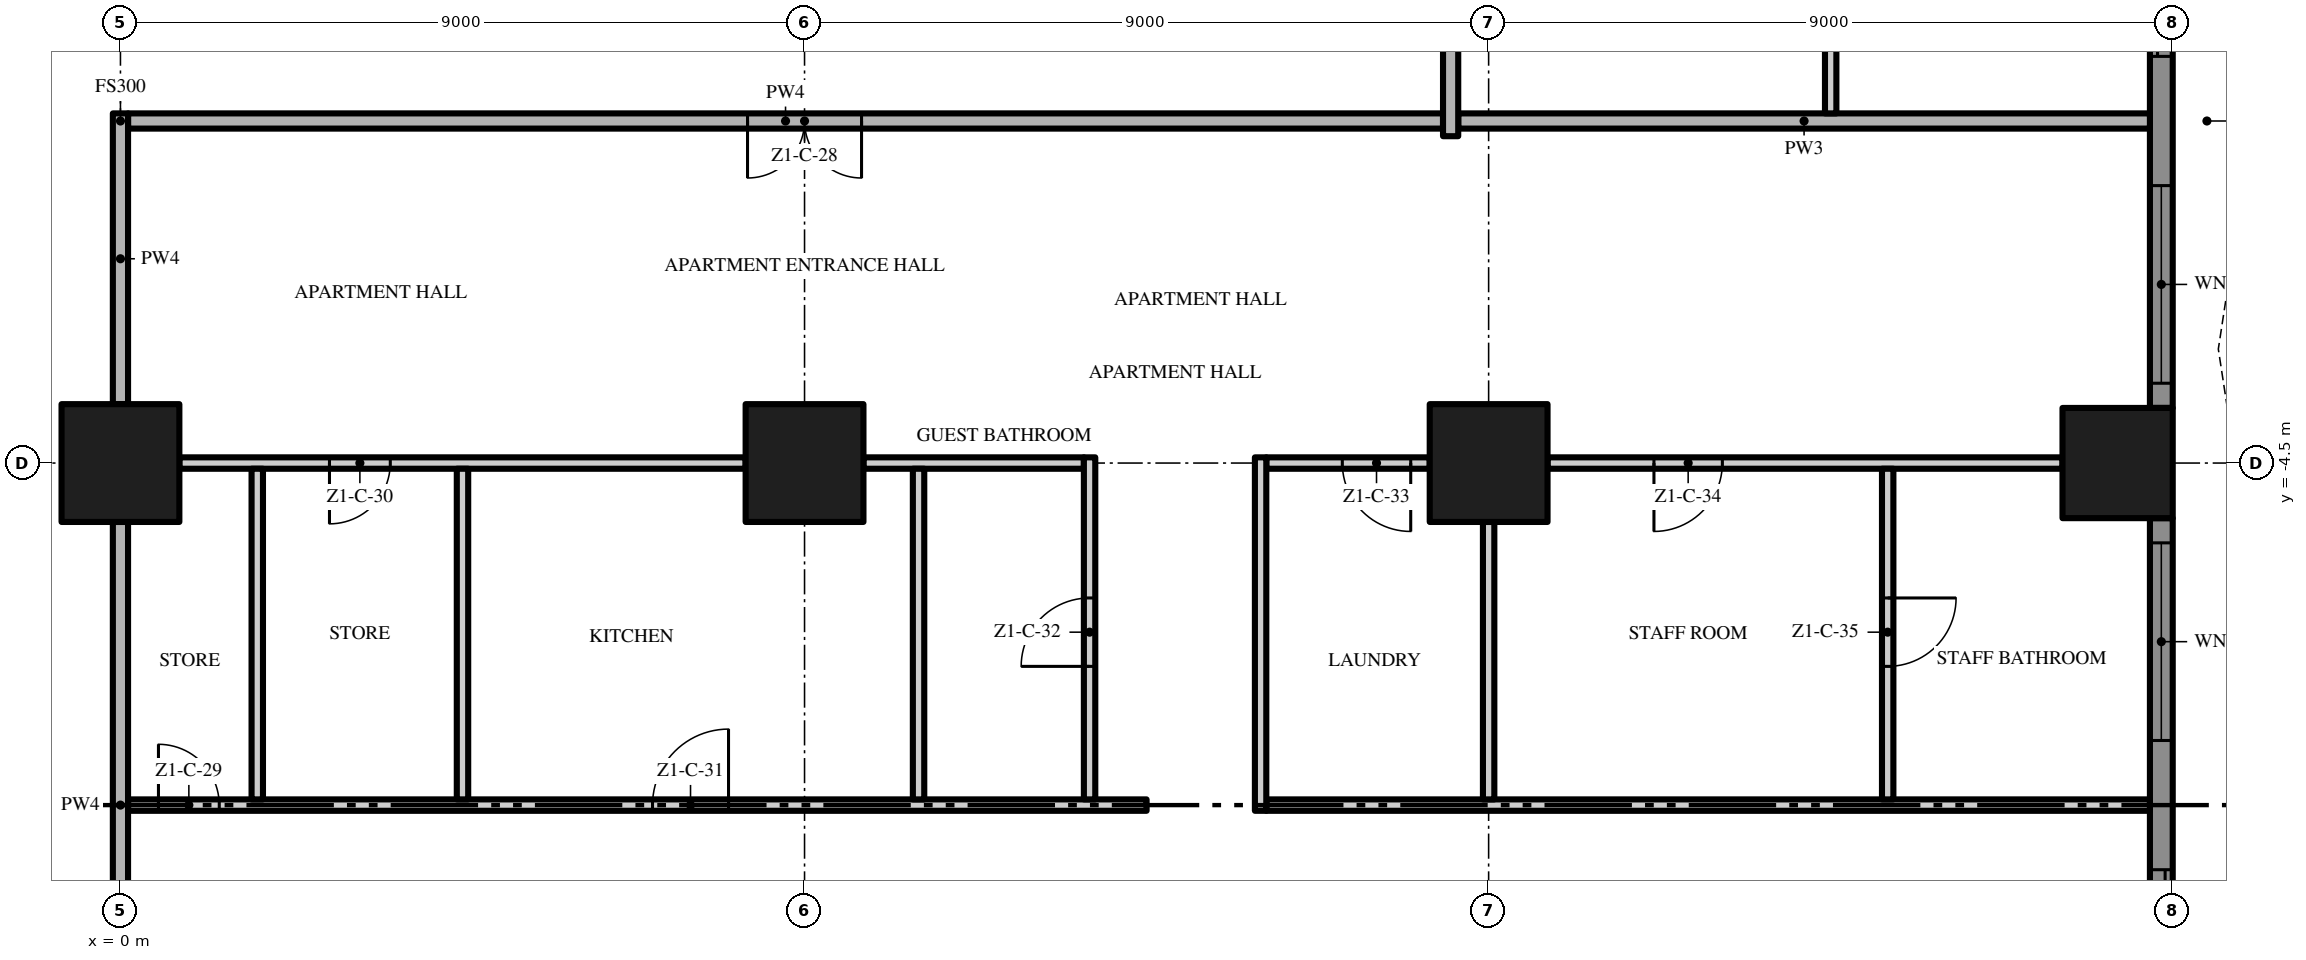
"""IFC4 building model, lengths in metres.
Left out: names, types, materials, properties, quantities, classifications, styles, units other than length and angle.
Written with IfcOpenShell. Run it as: python <this file> out.ifc"""

import sys

from ifc_helpers import new_model, si_unit, direction, frame, frame_2d, origin, origin_2d, place, context, subcontext, project, spatial, polyline, rectangle, outline, extrude, element, fill, save


model = new_model("IFC4")
c1 = context("Model", 3, precision=1e-05, world=origin(), true_north=direction((0.0, 1.0)))
c2 = subcontext(c1, "Body", "Model", "MODEL_VIEW")
j1 = project(units=[si_unit("LENGTHUNIT", "METRE"), si_unit("PLANEANGLEUNIT", "RADIAN")], contexts=[c1])
p1 = place(None, origin())
s1 = spatial("IfcSite", under=j1, at=p1, CompositionType="ELEMENT")
p2 = place(p1, origin())
s2 = spatial("IfcBuilding", under=s1, at=p2, CompositionType="ELEMENT")
p3 = place(p2, frame((0.0, 0.0, 37.8)))
s3 = spatial("IfcBuildingStorey", under=s2, at=p3, CompositionType="ELEMENT", Elevation=37.8)
for number, where, z_axis, x_axis in (
    (1, (0.0, -4.5, 0.0), (0.0, 0.0, 1.0), (1.0, 0.0, 0.0)),
    (2, (18.0, -4.5, 0.0), (0.0, 0.0, 1.0), (1.0, 0.0, 0.0)),
):
    element("IfcColumn", number, at=place(p3, frame(where, z_axis=z_axis, x_axis=x_axis)), inside=s3, PredefinedType="COLUMN", context=c2, shape_type="SweptSolid", body=[
        extrude(rectangle(XDim=1.55, YDim=1.55, at=origin_2d()), origin(), (0.0, 0.0, 1.0), 3.5),
    ])
p4 = place(p3, frame((26.275, -4.5, 0.0), z_axis=(0.0, 0.0, 1.0), x_axis=(1.0, 0.0, 0.0)))
e3 = element("IfcColumn", 3, at=p4, inside=s3, PredefinedType="COLUMN", context=c2, shape_type="SweptSolid", body=[
    extrude(rectangle(XDim=1.45, YDim=1.45, at=origin_2d()), origin(), (0.0, 0.0, 1.0), 3.5),
])
p5 = place(p3, frame((9.0, -4.5, 0.0), z_axis=(0.0, 0.0, 1.0), x_axis=(1.0, 0.0, 0.0)))
e4 = element("IfcColumn", 4, at=p5, inside=s3, PredefinedType="COLUMN", context=c2, shape_type="SweptSolid", body=[
    extrude(rectangle(XDim=1.55, YDim=1.55, at=origin_2d()), origin(), (0.0, 0.0, 1.0), 3.5),
])
p6 = place(p3, frame((26.85, -5.225, 0.0), z_axis=(0.0, 0.0, 1.0), x_axis=(0.0, -1.0, 0.0)))
e5 = element("IfcWall", 5, at=p6, inside=s3, PredefinedType="SOLIDWALL", context=c2, shape_type="SweptSolid", body=[
    extrude(rectangle(XDim=7.55, YDim=0.3, at=frame_2d((3.775, 0.0))), origin(), (0.0, 0.0, 1.0), 3.5),
])
p7 = place(p6, frame((4.625, 0.0, 0.0)))
e6 = element("IfcOpeningElement", 6, at=p7, cuts=e5, PredefinedType="OPENING", context=c2, shape_type="SweptSolid", body=[
    extrude(rectangle(XDim=2.6, YDim=2.4, at=frame_2d((1.3, 1.2))), frame((0.0, 0.16, 0.0), z_axis=(0.0, -1.0, 0.0), x_axis=(1.0, 0.0, 0.0)), (0.0, 0.0, 1.0), 0.32),
])
p8 = place(p6, frame((0.325, 0.0, 0.45)))
e7 = element("IfcOpeningElement", 7, at=p8, cuts=e5, PredefinedType="OPENING", context=c2, shape_type="SweptSolid", body=[
    extrude(rectangle(XDim=2.6, YDim=2.65, at=frame_2d((1.3, 1.325))), frame((0.0, 0.16, 0.0), z_axis=(0.0, -1.0, 0.0), x_axis=(1.0, 0.0, 0.0)), (0.0, 0.0, 1.0), 0.32),
])
p9 = place(p3, frame((26.85, 3.775, 0.0), z_axis=(0.0, 0.0, 1.0), x_axis=(0.0, -1.0, 0.0)))
e8 = element("IfcWall", 8, at=p9, inside=s3, PredefinedType="SOLIDWALL", context=c2, shape_type="SweptSolid", body=[
    extrude(rectangle(XDim=7.55, YDim=0.3, at=frame_2d((3.775, 0.0))), origin(), (0.0, 0.0, 1.0), 3.5),
])
p10 = place(p9, frame((4.625, 0.0, 0.45)))
e9 = element("IfcOpeningElement", 9, at=p10, cuts=e8, PredefinedType="OPENING", context=c2, shape_type="SweptSolid", body=[
    extrude(rectangle(XDim=2.6, YDim=2.65, at=frame_2d((1.3, 1.325))), frame((0.0, 0.16, 0.0), z_axis=(0.0, -1.0, 0.0), x_axis=(1.0, 0.0, 0.0)), (0.0, 0.0, 1.0), 0.32),
])
p11 = place(p9, frame((0.325, 0.0, 0.0)))
e10 = element("IfcOpeningElement", 10, at=p11, cuts=e8, PredefinedType="OPENING", context=c2, shape_type="SweptSolid", body=[
    extrude(rectangle(XDim=2.6, YDim=2.4, at=frame_2d((1.3, 1.2))), frame((0.0, 0.16, 0.0), z_axis=(0.0, -1.0, 0.0), x_axis=(1.0, 0.0, 0.0)), (0.0, 0.0, 1.0), 0.32),
])
p12 = place(p3, origin())
e11 = element("IfcWall", 11, at=p12, inside=s3, PredefinedType="USERDEFINED", context=c2, shape_type="SweptSolid", body=[
    extrude(outline(polyline([(27.6, -18.0), (27.829, -16.5), (28.429, -15.0), (29.171, -13.5), (29.771, -12.0), (30.0, -10.5), (29.771, -9.0), (29.171, -7.5), (28.429, -6.0), (27.829, -4.5), (27.6, -3.0), (27.829, -1.5), (28.429, 0.0), (29.171, 1.5), (29.771, 3.0), (30.0, 4.5), (29.771, 6.0), (29.171, 7.5), (28.429, 9.0), (27.829, 10.5), (27.6, 12.0), (27.829, 13.5), (28.429, 15.0), (29.171, 16.5), (29.771, 18.0), (29.539, 18.093), (28.942, 16.602), (28.201, 15.102), (27.586, 13.566), (27.347, 12.0), (27.586, 10.434), (28.201, 8.898), (28.942, 7.398), (29.528, 5.934), (29.747, 4.5), (29.528, 3.066), (28.942, 1.602), (28.201, 0.102), (27.586, -1.434), (27.347, -3.0), (27.586, -4.566), (28.201, -6.102), (28.942, -7.602), (29.528, -9.066), (29.747, -10.5), (29.528, -11.934), (28.942, -13.398), (28.201, -14.898), (27.586, -16.434), (27.353, -17.962), (27.6, -18.0)])), origin(), (0.0, 0.0, 1.0), 0.9),
])
p13 = place(p3, frame((0.1, -9.0, 0.0), z_axis=(0.0, 0.0, 1.0), x_axis=(1.0, 0.0, 0.0)))
e12 = element("IfcWall", 12, at=p13, inside=s3, PredefinedType="PARTITIONING", context=c2, shape_type="SweptSolid", body=[
    extrude(rectangle(XDim=13.4, YDim=0.15, at=frame_2d((6.7, 0.0))), origin(), (0.0, 0.0, 1.0), 3.5),
])
p14 = place(p13, frame((0.4, 0.0, 0.0)))
e13 = element("IfcOpeningElement", 13, at=p14, cuts=e12, PredefinedType="OPENING", context=c2, shape_type="SweptSolid", body=[
    extrude(rectangle(XDim=0.8, YDim=2.0, at=frame_2d((0.4, 1.0))), frame((0.0, 0.085, 0.0), z_axis=(0.0, -1.0, 0.0), x_axis=(1.0, 0.0, 0.0)), (0.0, 0.0, 1.0), 0.17),
])
p15 = place(p13, frame((6.9, 0.0, 0.0)))
e14 = element("IfcOpeningElement", 14, at=p15, cuts=e12, PredefinedType="OPENING", context=c2, shape_type="SweptSolid", body=[
    extrude(rectangle(XDim=1.0, YDim=2.4, at=frame_2d((0.5, 1.2))), frame((0.0, 0.085, 0.0), z_axis=(0.0, -1.0, 0.0), x_axis=(1.0, 0.0, 0.0)), (0.0, 0.0, 1.0), 0.17),
])
p16 = place(p3, frame((15.075, -9.0, 0.0), z_axis=(0.0, 0.0, 1.0), x_axis=(1.0, 0.0, 0.0)))
e15 = element("IfcWall", 15, at=p16, inside=s3, PredefinedType="PARTITIONING", context=c2, shape_type="SweptSolid", body=[
    extrude(rectangle(XDim=11.625, YDim=0.15, at=frame_2d((5.812, 0.0))), origin(), (0.0, 0.0, 1.0), 3.5),
])
p17 = place(p3, frame((8.225, -4.5, 0.0), z_axis=(0.0, 0.0, 1.0), x_axis=(-1.0, 0.0, 0.0)))
e16 = element("IfcWall", 16, at=p17, inside=s3, PredefinedType="PARTITIONING", context=c2, shape_type="SweptSolid", body=[
    extrude(rectangle(XDim=7.45, YDim=0.15, at=frame_2d((3.725, 0.0))), origin(), (0.0, 0.0, 1.0), 3.5),
])
p18 = place(p17, frame((4.675, 0.0, 0.0)))
e17 = element("IfcOpeningElement", 17, at=p18, cuts=e16, PredefinedType="OPENING", context=c2, shape_type="SweptSolid", body=[
    extrude(rectangle(XDim=0.8, YDim=2.0, at=frame_2d((0.4, 1.0))), frame((0.0, 0.085, 0.0), z_axis=(0.0, -1.0, 0.0), x_axis=(1.0, 0.0, 0.0)), (0.0, 0.0, 1.0), 0.17),
])
p19 = place(p3, frame((9.775, -4.5, 0.0), z_axis=(0.0, 0.0, 1.0), x_axis=(1.0, 0.0, 0.0)))
e18 = element("IfcWall", 18, at=p19, inside=s3, PredefinedType="PARTITIONING", context=c2, shape_type="SweptSolid", body=[
    extrude(rectangle(XDim=2.9, YDim=0.15, at=frame_2d((1.45, 0.0))), origin(), (0.0, 0.0, 1.0), 3.5),
])
p20 = place(p3, frame((17.225, -4.5, 0.0), z_axis=(0.0, 0.0, 1.0), x_axis=(-1.0, 0.0, 0.0)))
e19 = element("IfcWall", 19, at=p20, inside=s3, PredefinedType="PARTITIONING", context=c2, shape_type="SweptSolid", body=[
    extrude(rectangle(XDim=2.15, YDim=0.15, at=frame_2d((1.075, 0.0))), origin(), (0.0, 0.0, 1.0), 3.5),
])
p21 = place(p20, frame((0.25, 0.0, 0.0)))
e20 = element("IfcOpeningElement", 20, at=p21, cuts=e19, PredefinedType="OPENING", context=c2, shape_type="SweptSolid", body=[
    extrude(rectangle(XDim=0.9, YDim=2.1, at=frame_2d((0.45, 1.05))), frame((0.0, 0.085, 0.0), z_axis=(0.0, -1.0, 0.0), x_axis=(1.0, 0.0, 0.0)), (0.0, 0.0, 1.0), 0.17),
])
p22 = place(p3, frame((25.55, -4.5, 0.0), z_axis=(0.0, 0.0, 1.0), x_axis=(-1.0, 0.0, 0.0)))
e21 = element("IfcWall", 21, at=p22, inside=s3, PredefinedType="PARTITIONING", context=c2, shape_type="SweptSolid", body=[
    extrude(rectangle(XDim=6.775, YDim=0.15, at=frame_2d((3.388, 0.0))), origin(), (0.0, 0.0, 1.0), 3.5),
])
p23 = place(p22, frame((4.475, 0.0, 0.0)))
e22 = element("IfcOpeningElement", 22, at=p23, cuts=e21, PredefinedType="OPENING", context=c2, shape_type="SweptSolid", body=[
    extrude(rectangle(XDim=0.9, YDim=2.1, at=frame_2d((0.45, 1.05))), frame((0.0, 0.085, 0.0), z_axis=(0.0, -1.0, 0.0), x_axis=(1.0, 0.0, 0.0)), (0.0, 0.0, 1.0), 0.17),
])
p24 = place(p3, frame((17.4, 0.0, 0.0), z_axis=(0.0, 0.0, 1.0), x_axis=(-1.0, 0.0, 0.0)))
e23 = element("IfcWall", 23, at=p24, inside=s3, PredefinedType="PARTITIONING", context=c2, shape_type="SweptSolid", body=[
    extrude(rectangle(XDim=17.3, YDim=0.2, at=frame_2d((8.65, 0.0))), origin(), (0.0, 0.0, 1.0), 3.5),
])
p25 = place(p24, frame((7.65, 0.0, 0.0)))
e24 = element("IfcOpeningElement", 24, at=p25, cuts=e23, PredefinedType="OPENING", context=c2, shape_type="SweptSolid", body=[
    extrude(rectangle(XDim=1.5, YDim=2.4, at=frame_2d((0.75, 1.2))), frame((0.0, 0.11, 0.0), z_axis=(0.0, -1.0, 0.0), x_axis=(1.0, 0.0, 0.0)), (0.0, 0.0, 1.0), 0.22),
])
p26 = place(p3, frame((17.6, 0.0, 0.0), z_axis=(0.0, 0.0, 1.0), x_axis=(1.0, 0.0, 0.0)))
e25 = element("IfcWall", 25, at=p26, inside=s3, PredefinedType="PARTITIONING", context=c2, shape_type="SweptSolid", body=[
    extrude(rectangle(XDim=9.1, YDim=0.2, at=frame_2d((4.55, 0.0))), origin(), (0.0, 0.0, 1.0), 3.5),
])
p27 = place(p3, frame((0.0, -12.725, 0.0), z_axis=(0.0, 0.0, 1.0), x_axis=(0.0, 1.0, 0.0)))
e26 = element("IfcWall", 26, at=p27, inside=s3, PredefinedType="PARTITIONING", context=c2, shape_type="SweptSolid", body=[
    extrude(rectangle(XDim=7.45, YDim=0.2, at=frame_2d((3.725, 0.0))), origin(), (0.0, 0.0, 1.0), 3.5),
])
p28 = place(p3, frame((0.0, -3.725, 0.0), z_axis=(0.0, 0.0, 1.0), x_axis=(0.0, 1.0, 0.0)))
e27 = element("IfcWall", 27, at=p28, inside=s3, PredefinedType="PARTITIONING", context=c2, shape_type="SweptSolid", body=[
    extrude(rectangle(XDim=3.825, YDim=0.2, at=frame_2d((1.913, 0.0))), origin(), (0.0, 0.0, 1.0), 3.5),
])
for number, where, z_axis, x_axis in (
    (28, (1.8, -8.925, 0.0), (0.0, 0.0, 1.0), (0.0, 1.0, 0.0)),
    (29, (4.5, -8.925, 0.0), (0.0, 0.0, 1.0), (0.0, 1.0, 0.0)),
    (30, (10.5, -8.925, 0.0), (0.0, 0.0, 1.0), (0.0, 1.0, 0.0)),
):
    element("IfcWall", number, at=place(p3, frame(where, z_axis=z_axis, x_axis=x_axis)), inside=s3, PredefinedType="PARTITIONING", context=c2, shape_type="SweptSolid", body=[
        extrude(rectangle(XDim=4.35, YDim=0.15, at=frame_2d((2.175, 0.0))), origin(), (0.0, 0.0, 1.0), 3.5),
    ])
p29 = place(p3, frame((12.75, -8.925, 0.0), z_axis=(0.0, 0.0, 1.0), x_axis=(0.0, 1.0, 0.0)))
e31 = element("IfcWall", 31, at=p29, inside=s3, PredefinedType="PARTITIONING", context=c2, shape_type="SweptSolid", body=[
    extrude(rectangle(XDim=4.5, YDim=0.15, at=frame_2d((2.25, 0.0))), origin(), (0.0, 0.0, 1.0), 3.5),
])
p30 = place(p29, frame((1.75, 0.0, 0.0)))
e32 = element("IfcOpeningElement", 32, at=p30, cuts=e31, PredefinedType="OPENING", context=c2, shape_type="SweptSolid", body=[
    extrude(rectangle(XDim=0.9, YDim=2.1, at=frame_2d((0.45, 1.05))), frame((0.0, 0.085, 0.0), z_axis=(0.0, -1.0, 0.0), x_axis=(1.0, 0.0, 0.0)), (0.0, 0.0, 1.0), 0.17),
])
p31 = place(p3, frame((15.0, -9.075, 0.0), z_axis=(0.0, 0.0, 1.0), x_axis=(0.0, 1.0, 0.0)))
e33 = element("IfcWall", 33, at=p31, inside=s3, PredefinedType="PARTITIONING", context=c2, shape_type="SweptSolid", body=[
    extrude(rectangle(XDim=4.65, YDim=0.15, at=frame_2d((2.325, 0.0))), origin(), (0.0, 0.0, 1.0), 3.5),
])
p32 = place(p3, frame((17.5, -0.2, 0.0), z_axis=(0.0, 0.0, 1.0), x_axis=(0.0, 1.0, 0.0)))
e34 = element("IfcWall", 34, at=p32, inside=s3, PredefinedType="PARTITIONING", context=c2, shape_type="SweptSolid", body=[
    extrude(rectangle(XDim=3.925, YDim=0.2, at=frame_2d((1.962, 0.0))), origin(), (0.0, 0.0, 1.0), 3.5),
])
p33 = place(p3, frame((18.0, -8.925, 0.0), z_axis=(0.0, 0.0, 1.0), x_axis=(0.0, 1.0, 0.0)))
e35 = element("IfcWall", 35, at=p33, inside=s3, PredefinedType="PARTITIONING", context=c2, shape_type="SweptSolid", body=[
    extrude(rectangle(XDim=3.65, YDim=0.15, at=frame_2d((1.825, 0.0))), origin(), (0.0, 0.0, 1.0), 3.5),
])
p34 = place(p3, frame((22.5, 17.275, 0.0), z_axis=(0.0, 0.0, 1.0), x_axis=(0.0, -1.0, 0.0)))
e36 = element("IfcWall", 36, at=p34, inside=s3, PredefinedType="PARTITIONING", context=c2, shape_type="SweptSolid", body=[
    extrude(rectangle(XDim=17.175, YDim=0.15, at=frame_2d((8.588, 0.0))), origin(), (0.0, 0.0, 1.0), 3.5),
])
p35 = place(p34, frame((14.525, 0.0, 0.0)))
e37 = element("IfcOpeningElement", 37, at=p35, cuts=e36, PredefinedType="OPENING", context=c2, shape_type="SweptSolid", body=[
    extrude(rectangle(XDim=1.0, YDim=2.4, at=frame_2d((0.5, 1.2))), frame((0.0, 0.085, 0.0), z_axis=(0.0, -1.0, 0.0), x_axis=(1.0, 0.0, 0.0)), (0.0, 0.0, 1.0), 0.17),
])
p36 = place(p34, frame((7.375, 0.0, 0.0)))
e38 = element("IfcOpeningElement", 38, at=p36, cuts=e36, PredefinedType="OPENING", context=c2, shape_type="SweptSolid", body=[
    extrude(rectangle(XDim=1.8, YDim=2.4, at=frame_2d((0.9, 1.2))), frame((0.0, 0.085, 0.0), z_axis=(0.0, -1.0, 0.0), x_axis=(1.0, 0.0, 0.0)), (0.0, 0.0, 1.0), 0.17),
])
p37 = place(p34, frame((0.15, 0.0, 0.0)))
e39 = element("IfcOpeningElement", 39, at=p37, cuts=e36, PredefinedType="OPENING", context=c2, shape_type="SweptSolid", body=[
    extrude(rectangle(XDim=1.0, YDim=2.4, at=frame_2d((0.5, 1.2))), frame((0.0, 0.085, 0.0), z_axis=(0.0, -1.0, 0.0), x_axis=(1.0, 0.0, 0.0)), (0.0, 0.0, 1.0), 0.17),
])
p38 = place(p3, frame((23.25, -4.575, 0.0), z_axis=(0.0, 0.0, 1.0), x_axis=(0.0, -1.0, 0.0)))
e40 = element("IfcWall", 40, at=p38, inside=s3, PredefinedType="PARTITIONING", context=c2, shape_type="SweptSolid", body=[
    extrude(rectangle(XDim=4.35, YDim=0.15, at=frame_2d((2.175, 0.0))), origin(), (0.0, 0.0, 1.0), 3.5),
])
p39 = place(p38, frame((1.7, 0.0, 0.0)))
e41 = element("IfcOpeningElement", 41, at=p39, cuts=e40, PredefinedType="OPENING", context=c2, shape_type="SweptSolid", body=[
    extrude(rectangle(XDim=0.9, YDim=2.1, at=frame_2d((0.45, 1.05))), frame((0.0, 0.085, 0.0), z_axis=(0.0, -1.0, 0.0), x_axis=(1.0, 0.0, 0.0)), (0.0, 0.0, 1.0), 0.17),
])
p40 = place(p7, origin())
e42 = element("IfcDoor", 42, at=p40, inside=s3, OperationType="SINGLE_SWING_LEFT", PredefinedType="DOOR", context=c2, shape_type="SweptSolid", body=[
    extrude(rectangle(XDim=2.6, YDim=2.4, at=frame_2d((1.3, 1.2))), frame((0.0, 0.025, 0.0), z_axis=(0.0, -1.0, 0.0), x_axis=(1.0, 0.0, 0.0)), (0.0, 0.0, 1.0), 0.05),
])
fill(e6, e42)
p41 = place(p8, origin())
e43 = element("IfcWindow", 43, at=p41, inside=s3, PartitioningType="SINGLE_PANEL", PredefinedType="WINDOW", context=c2, shape_type="SweptSolid", body=[
    extrude(rectangle(XDim=2.6, YDim=2.65, at=frame_2d((1.3, 1.325))), frame((0.0, 0.03, 0.0), z_axis=(0.0, -1.0, 0.0), x_axis=(1.0, 0.0, 0.0)), (0.0, 0.0, 1.0), 0.06),
])
fill(e7, e43)
p42 = place(p10, origin())
e44 = element("IfcWindow", 44, at=p42, inside=s3, PartitioningType="SINGLE_PANEL", PredefinedType="WINDOW", context=c2, shape_type="SweptSolid", body=[
    extrude(rectangle(XDim=2.6, YDim=2.65, at=frame_2d((1.3, 1.325))), frame((0.0, 0.03, 0.0), z_axis=(0.0, -1.0, 0.0), x_axis=(1.0, 0.0, 0.0)), (0.0, 0.0, 1.0), 0.06),
])
fill(e9, e44)
p43 = place(p11, origin())
e45 = element("IfcDoor", 45, at=p43, inside=s3, OperationType="SINGLE_SWING_LEFT", PredefinedType="DOOR", context=c2, shape_type="SweptSolid", body=[
    extrude(rectangle(XDim=2.6, YDim=2.4, at=frame_2d((1.3, 1.2))), frame((0.0, 0.025, 0.0), z_axis=(0.0, -1.0, 0.0), x_axis=(1.0, 0.0, 0.0)), (0.0, 0.0, 1.0), 0.05),
])
fill(e10, e45)
p44 = place(p25, origin())
e46 = element("IfcDoor", 46, at=p44, inside=s3, OperationType="DOUBLE_DOOR_SINGLE_SWING", PredefinedType="DOOR", context=c2, shape_type="SweptSolid", body=[
    extrude(rectangle(XDim=1.5, YDim=2.4, at=frame_2d((0.75, 1.2))), frame((0.0, 0.025, 0.0), z_axis=(0.0, -1.0, 0.0), x_axis=(1.0, 0.0, 0.0)), (0.0, 0.0, 1.0), 0.05),
])
fill(e24, e46)
p45 = place(p14, origin())
e47 = element("IfcDoor", 47, at=p45, inside=s3, OperationType="SINGLE_SWING_LEFT", PredefinedType="DOOR", context=c2, shape_type="SweptSolid", body=[
    extrude(rectangle(XDim=0.8, YDim=2.0, at=frame_2d((0.4, 1.0))), frame((0.0, 0.025, 0.0), z_axis=(0.0, -1.0, 0.0), x_axis=(1.0, 0.0, 0.0)), (0.0, 0.0, 1.0), 0.05),
])
fill(e13, e47)
p46 = place(p18, origin())
e48 = element("IfcDoor", 48, at=p46, inside=s3, OperationType="SINGLE_SWING_RIGHT", PredefinedType="DOOR", context=c2, shape_type="SweptSolid", body=[
    extrude(rectangle(XDim=0.8, YDim=2.0, at=frame_2d((0.4, 1.0))), frame((0.0, 0.025, 0.0), z_axis=(0.0, -1.0, 0.0), x_axis=(1.0, 0.0, 0.0)), (0.0, 0.0, 1.0), 0.05),
])
fill(e17, e48)
p47 = place(p15, origin())
e49 = element("IfcDoor", 49, at=p47, inside=s3, OperationType="SINGLE_SWING_RIGHT", PredefinedType="DOOR", context=c2, shape_type="SweptSolid", body=[
    extrude(rectangle(XDim=1.0, YDim=2.4, at=frame_2d((0.5, 1.2))), frame((0.0, 0.025, 0.0), z_axis=(0.0, -1.0, 0.0), x_axis=(1.0, 0.0, 0.0)), (0.0, 0.0, 1.0), 0.05),
])
fill(e14, e49)
p48 = place(p30, origin())
e50 = element("IfcDoor", 50, at=p48, inside=s3, OperationType="SINGLE_SWING_LEFT", PredefinedType="DOOR", context=c2, shape_type="SweptSolid", body=[
    extrude(rectangle(XDim=0.9, YDim=2.1, at=frame_2d((0.45, 1.05))), frame((0.0, 0.025, 0.0), z_axis=(0.0, -1.0, 0.0), x_axis=(1.0, 0.0, 0.0)), (0.0, 0.0, 1.0), 0.05),
])
fill(e32, e50)
p49 = place(p21, origin())
e51 = element("IfcDoor", 51, at=p49, inside=s3, OperationType="SINGLE_SWING_LEFT", PredefinedType="DOOR", context=c2, shape_type="SweptSolid", body=[
    extrude(rectangle(XDim=0.9, YDim=2.1, at=frame_2d((0.45, 1.05))), frame((0.0, 0.025, 0.0), z_axis=(0.0, -1.0, 0.0), x_axis=(1.0, 0.0, 0.0)), (0.0, 0.0, 1.0), 0.05),
])
fill(e20, e51)
p50 = place(p23, origin())
e52 = element("IfcDoor", 52, at=p50, inside=s3, OperationType="SINGLE_SWING_RIGHT", PredefinedType="DOOR", context=c2, shape_type="SweptSolid", body=[
    extrude(rectangle(XDim=0.9, YDim=2.1, at=frame_2d((0.45, 1.05))), frame((0.0, 0.025, 0.0), z_axis=(0.0, -1.0, 0.0), x_axis=(1.0, 0.0, 0.0)), (0.0, 0.0, 1.0), 0.05),
])
fill(e22, e52)
p51 = place(p39, origin())
e53 = element("IfcDoor", 53, at=p51, inside=s3, OperationType="SINGLE_SWING_LEFT", PredefinedType="DOOR", context=c2, shape_type="SweptSolid", body=[
    extrude(rectangle(XDim=0.9, YDim=2.1, at=frame_2d((0.45, 1.05))), frame((0.0, 0.025, 0.0), z_axis=(0.0, -1.0, 0.0), x_axis=(1.0, 0.0, 0.0)), (0.0, 0.0, 1.0), 0.05),
])
fill(e41, e53)
save(model, sys.argv[1])
